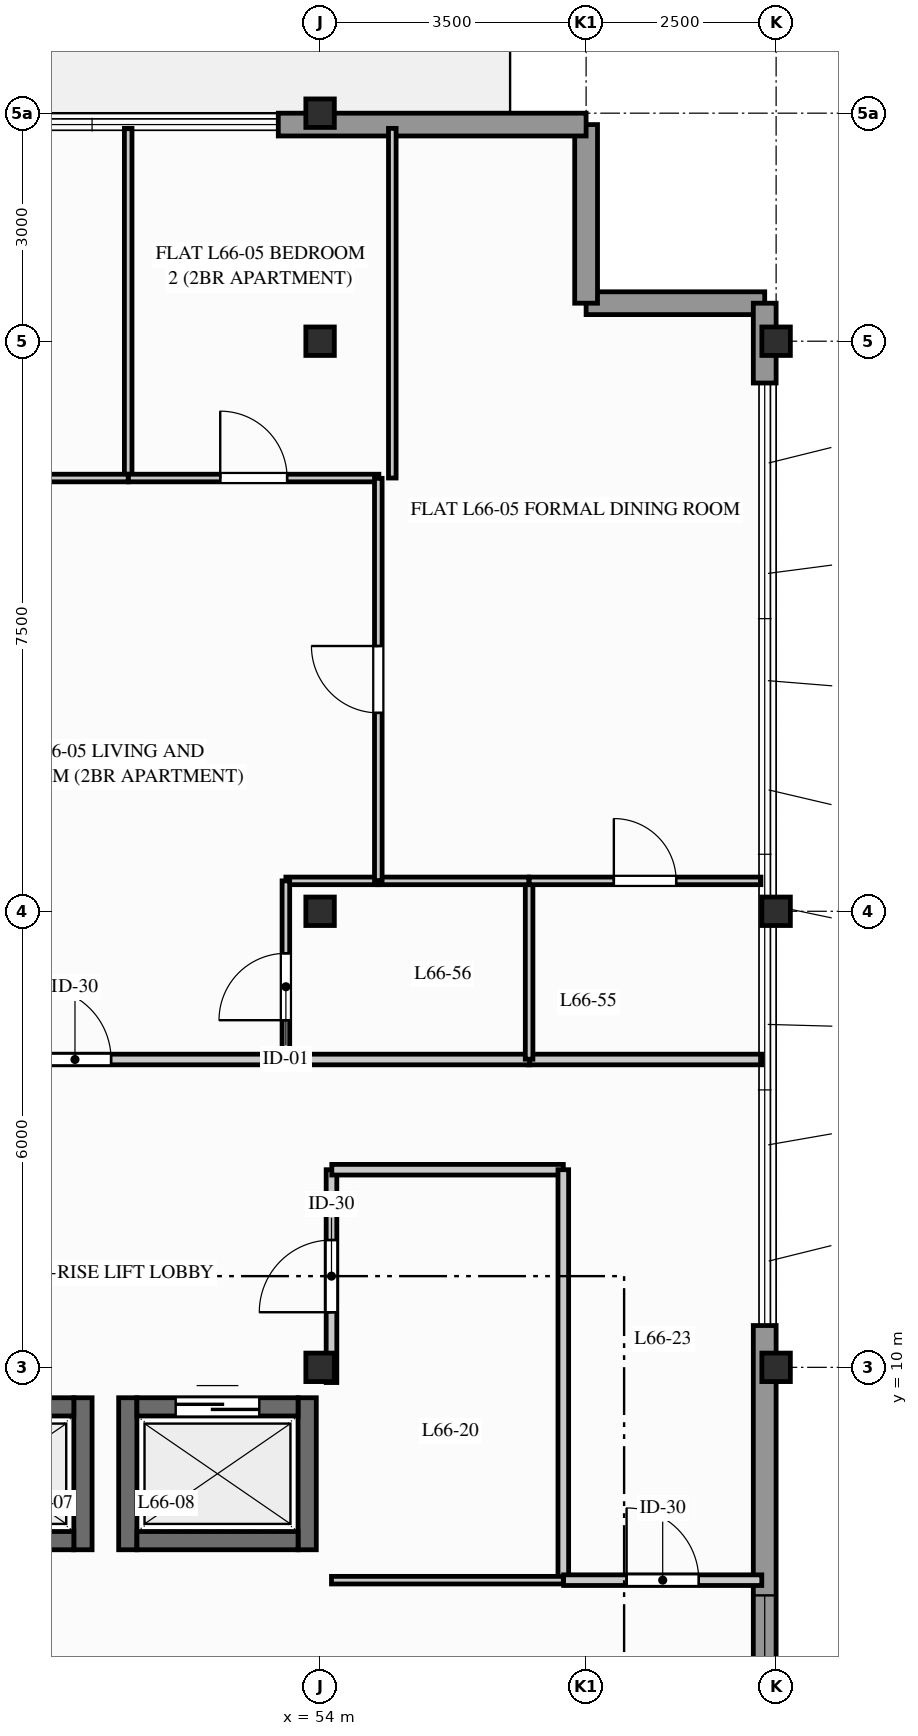
"""IFC4 building model, lengths in metres.
Left out: names, types, materials, properties, quantities, classifications, styles, units other than length and angle.
Written with IfcOpenShell. Run it as: python <this file> out.ifc"""

import sys

from ifc_helpers import new_model, si_unit, direction, frame, frame_2d, origin, origin_2d, place, context, subcontext, project, spatial, rectangle, i_section, extrude, element, fill, save


model = new_model("IFC4")
c1 = context("Model", 3, precision=1e-05, world=origin(), true_north=direction((0.0, 1.0)))
c2 = subcontext(c1, "Body", "Model", "MODEL_VIEW")
j1 = project(units=[si_unit("LENGTHUNIT", "METRE"), si_unit("PLANEANGLEUNIT", "RADIAN")], contexts=[c1])
p1 = place(None, origin())
s1 = spatial("IfcSite", under=j1, at=p1, CompositionType="ELEMENT")
p2 = place(p1, origin())
s2 = spatial("IfcBuilding", under=s1, at=p2, CompositionType="ELEMENT")
p3 = place(p2, frame((0.0, 0.0, 218.0)))
s3 = spatial("IfcBuildingStorey", under=s2, at=p3, CompositionType="ELEMENT", Elevation=218.0)
for number, where, z_axis, x_axis in (
    (1, (54.0, 10.0, 0.0), (0.0, 0.0, 1.0), (1.0, 0.0, 0.0)),
    (2, (54.0, 16.0, 0.0), (0.0, 0.0, 1.0), (1.0, 0.0, 0.0)),
    (3, (54.0, 23.5, 0.0), (0.0, 0.0, 1.0), (1.0, 0.0, 0.0)),
    (4, (54.0, 26.5, 0.0), (0.0, 0.0, 1.0), (1.0, 0.0, 0.0)),
    (5, (60.0, 10.0, 0.0), (0.0, 0.0, 1.0), (1.0, 0.0, 0.0)),
    (6, (60.0, 16.0, 0.0), (0.0, 0.0, 1.0), (1.0, 0.0, 0.0)),
    (7, (60.0, 23.5, 0.0), (0.0, 0.0, 1.0), (1.0, 0.0, 0.0)),
):
    element("IfcColumn", number, at=place(p3, frame(where, z_axis=z_axis, x_axis=x_axis)), inside=s3, PredefinedType="COLUMN", context=c2, shape_type="SweptSolid", body=[
        extrude(i_section(OverallWidth=0.375, OverallDepth=0.375, WebThickness=0.017, FlangeThickness=0.027, FilletRadius=0.015, at=origin_2d()), origin(), (0.0, 0.0, 1.0), 3.1),
    ])
for number, where, z_axis, x_axis in (
    (8, (59.85, 24.0, 0.0), (0.0, 0.0, 1.0), (-1.0, 0.0, 0.0)),
    (9, (57.5, 24.0, 0.0), (0.0, 0.0, 1.0), (0.0, 1.0, 0.0)),
):
    element("IfcWall", number, at=place(p3, frame(where, z_axis=z_axis, x_axis=x_axis)), inside=s3, PredefinedType="STANDARD", context=c2, shape_type="SweptSolid", body=[
        extrude(rectangle(XDim=2.35, YDim=0.3, at=frame_2d((1.175, 0.0))), origin(), (0.0, 0.0, 1.0), 2.89),
    ])
p4 = place(p3, frame((59.85, 2.5, 0.0), z_axis=(0.0, 0.0, 1.0), x_axis=(0.0, 1.0, 0.0)))
e10 = element("IfcWall", 10, at=p4, inside=s3, PredefinedType="STANDARD", context=c2, shape_type="SweptSolid", body=[
    extrude(rectangle(XDim=8.05, YDim=0.3, at=frame_2d((4.025, 0.0))), origin(), (0.0, 0.0, 1.0), 2.89),
])
p5 = place(p4, frame((3.0, 0.0, 0.87)))
e11 = element("IfcOpeningElement", 11, at=p5, cuts=e10, PredefinedType="OPENING", context=c2, shape_type="SweptSolid", body=[
    extrude(rectangle(XDim=1.5, YDim=1.8, at=frame_2d((0.75, 0.9))), frame((0.0, 0.16, 0.0), z_axis=(0.0, -1.0, 0.0), x_axis=(1.0, 0.0, 0.0)), (0.0, 0.0, 1.0), 0.32),
])
p6 = place(p3, frame((59.85, 22.95, 0.0), z_axis=(0.0, 0.0, 1.0), x_axis=(0.0, 1.0, 0.0)))
e12 = element("IfcWall", 12, at=p6, inside=s3, PredefinedType="STANDARD", context=c2, shape_type="SweptSolid", body=[
    extrude(rectangle(XDim=1.05, YDim=0.3, at=frame_2d((0.525, 0.0))), origin(), (0.0, 0.0, 1.0), 2.89),
])
p7 = place(p3, frame((53.45, 26.35, 0.0), z_axis=(0.0, 0.0, 1.0), x_axis=(1.0, 0.0, 0.0)))
e13 = element("IfcWall", 13, at=p7, inside=s3, PredefinedType="STANDARD", context=c2, shape_type="SweptSolid", body=[
    extrude(rectangle(XDim=4.05, YDim=0.3, at=frame_2d((2.025, 0.0))), origin(), (0.0, 0.0, 1.0), 2.89),
])
p8 = place(p3, frame((50.88, 7.6, 0.0), z_axis=(0.0, 0.0, 1.0), x_axis=(0.0, 1.0, 0.0)))
e14 = element("IfcWall", 14, at=p8, inside=s3, PredefinedType="SHEAR", context=c2, shape_type="SweptSolid", body=[
    extrude(rectangle(XDim=2.0, YDim=0.24, at=frame_2d((1.0, 0.0))), origin(), (0.0, 0.0, 1.0), 2.89),
])
p9 = place(p3, frame((48.64, 7.72, 0.0), z_axis=(0.0, 0.0, 1.0), x_axis=(1.0, 0.0, 0.0)))
e15 = element("IfcWall", 15, at=p9, inside=s3, PredefinedType="SHEAR", context=c2, shape_type="SweptSolid", body=[
    extrude(rectangle(XDim=2.12, YDim=0.24, at=frame_2d((1.06, 0.0))), origin(), (0.0, 0.0, 1.0), 2.89),
])
p10 = place(p3, frame((48.64, 9.48, 0.0), z_axis=(0.0, 0.0, 1.0), x_axis=(1.0, 0.0, 0.0)))
e16 = element("IfcWall", 16, at=p10, inside=s3, PredefinedType="SHEAR", context=c2, shape_type="SweptSolid", body=[
    extrude(rectangle(XDim=2.12, YDim=0.24, at=frame_2d((1.06, 0.0))), origin(), (0.0, 0.0, 1.0), 2.89),
])
p11 = place(p10, frame((0.51, 0.0, 0.0)))
e17 = element("IfcOpeningElement", 17, at=p11, cuts=e16, PredefinedType="OPENING", context=c2, shape_type="SweptSolid", body=[
    extrude(rectangle(XDim=1.1, YDim=2.06, at=frame_2d((0.55, 1.03))), frame((0.0, 0.13, 0.0), z_axis=(0.0, -1.0, 0.0), x_axis=(1.0, 0.0, 0.0)), (0.0, 0.0, 1.0), 0.26),
])
for number, where, z_axis, x_axis in (
    (18, (51.47, 7.6, 0.0), (0.0, 0.0, 1.0), (0.0, 1.0, 0.0)),
    (19, (53.83, 7.6, 0.0), (0.0, 0.0, 1.0), (0.0, 1.0, 0.0)),
):
    element("IfcWall", number, at=place(p3, frame(where, z_axis=z_axis, x_axis=x_axis)), inside=s3, PredefinedType="SHEAR", context=c2, shape_type="SweptSolid", body=[
        extrude(rectangle(XDim=2.0, YDim=0.24, at=frame_2d((1.0, 0.0))), origin(), (0.0, 0.0, 1.0), 2.89),
    ])
p12 = place(p3, frame((51.59, 7.72, 0.0), z_axis=(0.0, 0.0, 1.0), x_axis=(1.0, 0.0, 0.0)))
e20 = element("IfcWall", 20, at=p12, inside=s3, PredefinedType="SHEAR", context=c2, shape_type="SweptSolid", body=[
    extrude(rectangle(XDim=2.12, YDim=0.24, at=frame_2d((1.06, 0.0))), origin(), (0.0, 0.0, 1.0), 2.89),
])
p13 = place(p3, frame((51.59, 9.48, 0.0), z_axis=(0.0, 0.0, 1.0), x_axis=(1.0, 0.0, 0.0)))
e21 = element("IfcWall", 21, at=p13, inside=s3, PredefinedType="SHEAR", context=c2, shape_type="SweptSolid", body=[
    extrude(rectangle(XDim=2.12, YDim=0.24, at=frame_2d((1.06, 0.0))), origin(), (0.0, 0.0, 1.0), 2.89),
])
p14 = place(p13, frame((0.51, 0.0, 0.0)))
e22 = element("IfcOpeningElement", 22, at=p14, cuts=e21, PredefinedType="OPENING", context=c2, shape_type="SweptSolid", body=[
    extrude(rectangle(XDim=1.1, YDim=2.06, at=frame_2d((0.55, 1.03))), frame((0.0, 0.13, 0.0), z_axis=(0.0, -1.0, 0.0), x_axis=(1.0, 0.0, 0.0)), (0.0, 0.0, 1.0), 0.26),
])
p15 = place(p3, frame((54.15, 9.8, 0.0), z_axis=(0.0, 0.0, 1.0), x_axis=(0.0, 1.0, 0.0)))
e23 = element("IfcWall", 23, at=p15, inside=s3, PredefinedType="PARTITIONING", context=c2, shape_type="SweptSolid", body=[
    extrude(rectangle(XDim=2.8, YDim=0.14, at=frame_2d((1.4, 0.0))), origin(), (0.0, 0.0, 1.0), 2.325),
])
p16 = place(p15, frame((0.925, 0.0, 0.0)))
e24 = element("IfcOpeningElement", 24, at=p16, cuts=e23, PredefinedType="OPENING", context=c2, shape_type="SweptSolid", body=[
    extrude(rectangle(XDim=0.95, YDim=2.05, at=frame_2d((0.475, 1.025))), frame((0.0, 0.08, 0.0), z_axis=(0.0, -1.0, 0.0), x_axis=(1.0, 0.0, 0.0)), (0.0, 0.0, 1.0), 0.16),
])
p17 = place(p3, frame((54.154, 12.6, 0.0), z_axis=(0.0, 0.0, 1.0), x_axis=(1.0, 0.0, 0.0)))
e25 = element("IfcWall", 25, at=p17, inside=s3, PredefinedType="PARTITIONING", context=c2, shape_type="SweptSolid", body=[
    extrude(rectangle(XDim=3.046, YDim=0.14, at=frame_2d((1.523, 0.0))), origin(), (0.0, 0.0, 1.0), 2.89),
])
p18 = place(p3, frame((57.2, 7.2, 0.0), z_axis=(0.0, 0.0, 1.0), x_axis=(0.0, 1.0, 0.0)))
e26 = element("IfcWall", 26, at=p18, inside=s3, PredefinedType="PARTITIONING", context=c2, shape_type="SweptSolid", body=[
    extrude(rectangle(XDim=5.4, YDim=0.14, at=frame_2d((2.7, 0.0))), origin(), (0.0, 0.0, 1.0), 2.325),
])
p19 = place(p3, frame((54.15, 7.2, 0.0), z_axis=(0.0, 0.0, 1.0), x_axis=(1.0, 0.0, 0.0)))
e27 = element("IfcWall", 27, at=p19, inside=s3, PredefinedType="PARTITIONING", context=c2, shape_type="SweptSolid", body=[
    extrude(rectangle(XDim=3.05, YDim=0.1, at=frame_2d((1.525, 0.0))), origin(), (0.0, 0.0, 1.0), 2.89),
])
p20 = place(p3, frame((56.739, 14.05, 0.0), z_axis=(0.0, 0.0, 1.0), x_axis=(1.0, 0.0, 0.0)))
e28 = element("IfcWall", 28, at=p20, inside=s3, PredefinedType="PARTITIONING", context=c2, shape_type="SweptSolid", body=[
    extrude(rectangle(XDim=3.073, YDim=0.14, at=frame_2d((1.536, 0.0))), origin(), (0.0, 0.0, 1.0), 2.89),
])
p21 = place(p3, frame((53.539, 14.05, 0.0), z_axis=(0.0, 0.0, 1.0), x_axis=(1.0, 0.0, 0.0)))
e29 = element("IfcWall", 29, at=p21, inside=s3, PredefinedType="PARTITIONING", context=c2, shape_type="SweptSolid", body=[
    extrude(rectangle(XDim=3.219, YDim=0.14, at=frame_2d((1.609, 0.0))), origin(), (0.0, 0.0, 1.0), 2.325),
])
p22 = place(p3, frame((47.993, 14.05, 0.0), z_axis=(0.0, 0.0, 1.0), x_axis=(1.0, 0.0, 0.0)))
e30 = element("IfcWall", 30, at=p22, inside=s3, PredefinedType="PARTITIONING", context=c2, shape_type="SweptSolid", body=[
    extrude(rectangle(XDim=5.565, YDim=0.14, at=frame_2d((2.782, 0.0))), origin(), (0.0, 0.0, 1.0), 2.325),
])
p23 = place(p22, frame((2.307, 0.0, 0.0)))
e31 = element("IfcOpeningElement", 31, at=p23, cuts=e30, PredefinedType="OPENING", context=c2, shape_type="SweptSolid", body=[
    extrude(rectangle(XDim=0.95, YDim=2.05, at=frame_2d((0.475, 1.025))), frame((0.0, 0.08, 0.0), z_axis=(0.0, -1.0, 0.0), x_axis=(1.0, 0.0, 0.0)), (0.0, 0.0, 1.0), 0.16),
])
p24 = place(p3, frame((57.204, 7.2, 0.0), z_axis=(0.0, 0.0, 1.0), x_axis=(1.0, 0.0, 0.0)))
e32 = element("IfcWall", 32, at=p24, inside=s3, PredefinedType="PARTITIONING", context=c2, shape_type="SweptSolid", body=[
    extrude(rectangle(XDim=2.607, YDim=0.14, at=frame_2d((1.304, 0.0))), origin(), (0.0, 0.0, 1.0), 2.89),
])
p25 = place(p24, frame((0.829, 0.0, 0.0)))
e33 = element("IfcOpeningElement", 33, at=p25, cuts=e32, PredefinedType="OPENING", context=c2, shape_type="SweptSolid", body=[
    extrude(rectangle(XDim=0.95, YDim=2.05, at=frame_2d((0.475, 1.025))), frame((0.0, 0.08, 0.0), z_axis=(0.0, -1.0, 0.0), x_axis=(1.0, 0.0, 0.0)), (0.0, 0.0, 1.0), 0.16),
])
p26 = place(p3, frame((56.75, 14.054, 0.0), z_axis=(0.0, 0.0, 1.0), x_axis=(0.0, 1.0, 0.0)))
e34 = element("IfcWall", 34, at=p26, inside=s3, PredefinedType="PARTITIONING", context=c2, shape_type="SweptSolid", body=[
    extrude(rectangle(XDim=2.346, YDim=0.1, at=frame_2d((1.173, 0.0))), origin(), (0.0, 0.0, 1.0), 2.325),
])
p27 = place(p3, frame((56.75, 16.4, 0.0), z_axis=(0.0, 0.0, 1.0), x_axis=(1.0, 0.0, 0.0)))
e35 = element("IfcWall", 35, at=p27, inside=s3, PredefinedType="PARTITIONING", context=c2, shape_type="SweptSolid", body=[
    extrude(rectangle(XDim=3.05, YDim=0.1, at=frame_2d((1.525, 0.0))), origin(), (0.0, 0.0, 1.0), 2.89),
])
p28 = place(p27, frame((1.115, 0.0, 0.0)))
e36 = element("IfcOpeningElement", 36, at=p28, cuts=e35, PredefinedType="OPENING", context=c2, shape_type="SweptSolid", body=[
    extrude(rectangle(XDim=0.82, YDim=2.02, at=frame_2d((0.41, 1.01))), frame((0.0, 0.06, 0.0), z_axis=(0.0, -1.0, 0.0), x_axis=(1.0, 0.0, 0.0)), (0.0, 0.0, 1.0), 0.12),
])
p29 = place(p3, frame((54.755, 16.4, 0.0), z_axis=(0.0, 0.0, 1.0), x_axis=(1.0, 0.0, 0.0)))
e37 = element("IfcWall", 37, at=p29, inside=s3, PredefinedType="PARTITIONING", context=c2, shape_type="SweptSolid", body=[
    extrude(rectangle(XDim=1.991, YDim=0.1, at=frame_2d((0.996, 0.0))), origin(), (0.0, 0.0, 1.0), 2.89),
])
p30 = place(p3, frame((53.55, 16.4, 0.0), z_axis=(0.0, 0.0, 1.0), x_axis=(1.0, 0.0, 0.0)))
e38 = element("IfcWall", 38, at=p30, inside=s3, PredefinedType="PARTITIONING", context=c2, shape_type="SweptSolid", body=[
    extrude(rectangle(XDim=1.223, YDim=0.1, at=frame_2d((0.612, 0.0))), origin(), (0.0, 0.0, 1.0), 2.325),
])
p31 = place(p3, frame((53.55, 14.054, 0.0), z_axis=(0.0, 0.0, 1.0), x_axis=(0.0, 1.0, 0.0)))
e39 = element("IfcWall", 39, at=p31, inside=s3, PredefinedType="PARTITIONING", context=c2, shape_type="SweptSolid", body=[
    extrude(rectangle(XDim=2.346, YDim=0.1, at=frame_2d((1.173, 0.0))), origin(), (0.0, 0.0, 1.0), 2.325),
])
p32 = place(p31, frame((0.513, 0.0, 0.0)))
e40 = element("IfcOpeningElement", 40, at=p32, cuts=e39, PredefinedType="OPENING", context=c2, shape_type="SweptSolid", body=[
    extrude(rectangle(XDim=0.88, YDim=2.04, at=frame_2d((0.44, 1.02))), frame((0.0, 0.06, 0.0), z_axis=(0.0, -1.0, 0.0), x_axis=(1.0, 0.0, 0.0)), (0.0, 0.0, 1.0), 0.12),
])
p33 = place(p3, frame((51.475, 21.7, 0.0), z_axis=(0.0, 0.0, 1.0), x_axis=(0.0, 1.0, 0.0)))
e41 = element("IfcWall", 41, at=p33, inside=s3, PredefinedType="PARTITIONING", context=c2, shape_type="SweptSolid", body=[
    extrude(rectangle(XDim=4.6, YDim=0.1, at=frame_2d((2.3, 0.0))), origin(), (0.0, 0.0, 1.0), 2.325),
])
p34 = place(p3, frame((48.004, 21.7, 0.0), z_axis=(0.0, 0.0, 1.0), x_axis=(1.0, 0.0, 0.0)))
e42 = element("IfcWall", 42, at=p34, inside=s3, PredefinedType="PARTITIONING", context=c2, shape_type="SweptSolid", body=[
    extrude(rectangle(XDim=3.471, YDim=0.1, at=frame_2d((1.736, 0.0))), origin(), (0.0, 0.0, 1.0), 2.325),
])
p35 = place(p34, frame((1.295, 0.0, 0.0)))
e43 = element("IfcOpeningElement", 43, at=p35, cuts=e42, PredefinedType="OPENING", context=c2, shape_type="SweptSolid", body=[
    extrude(rectangle(XDim=0.88, YDim=2.04, at=frame_2d((0.44, 1.02))), frame((0.0, 0.06, 0.0), z_axis=(0.0, -1.0, 0.0), x_axis=(1.0, 0.0, 0.0)), (0.0, 0.0, 1.0), 0.12),
])
p36 = place(p3, frame((54.95, 21.7, 0.0), z_axis=(0.0, 0.0, 1.0), x_axis=(0.0, 1.0, 0.0)))
e44 = element("IfcWall", 44, at=p36, inside=s3, PredefinedType="PARTITIONING", context=c2, shape_type="SweptSolid", body=[
    extrude(rectangle(XDim=4.6, YDim=0.1, at=frame_2d((2.3, 0.0))), origin(), (0.0, 0.0, 1.0), 2.325),
])
p37 = place(p3, frame((51.479, 21.7, 0.0), z_axis=(0.0, 0.0, 1.0), x_axis=(1.0, 0.0, 0.0)))
e45 = element("IfcWall", 45, at=p37, inside=s3, PredefinedType="PARTITIONING", context=c2, shape_type="SweptSolid", body=[
    extrude(rectangle(XDim=3.294, YDim=0.1, at=frame_2d((1.647, 0.0))), origin(), (0.0, 0.0, 1.0), 2.325),
])
p38 = place(p37, frame((1.207, 0.0, 0.0)))
e46 = element("IfcOpeningElement", 46, at=p38, cuts=e45, PredefinedType="OPENING", context=c2, shape_type="SweptSolid", body=[
    extrude(rectangle(XDim=0.88, YDim=2.04, at=frame_2d((0.44, 1.02))), frame((0.0, 0.06, 0.0), z_axis=(0.0, -1.0, 0.0), x_axis=(1.0, 0.0, 0.0)), (0.0, 0.0, 1.0), 0.12),
])
p39 = place(p3, frame((54.766, 16.404, 0.0), z_axis=(0.0, 0.0, 1.0), x_axis=(0.0, 1.0, 0.0)))
e47 = element("IfcWall", 47, at=p39, inside=s3, PredefinedType="PARTITIONING", context=c2, shape_type="SweptSolid", body=[
    extrude(rectangle(XDim=5.292, YDim=0.1, at=frame_2d((2.646, 0.0))), origin(), (0.0, 0.0, 1.0), 2.614),
])
p40 = place(p39, frame((2.206, 0.0, 0.0)))
e48 = element("IfcOpeningElement", 48, at=p40, cuts=e47, PredefinedType="OPENING", context=c2, shape_type="SweptSolid", body=[
    extrude(rectangle(XDim=0.88, YDim=2.04, at=frame_2d((0.44, 1.02))), frame((0.0, 0.06, 0.0), z_axis=(0.0, -1.0, 0.0), x_axis=(1.0, 0.0, 0.0)), (0.0, 0.0, 1.0), 0.12),
])
p41 = place(p5, origin())
e49 = element("IfcWindow", 49, at=p41, inside=s3, PartitioningType="SINGLE_PANEL", PredefinedType="WINDOW", context=c2, shape_type="SweptSolid", body=[
    extrude(rectangle(XDim=1.5, YDim=1.8, at=frame_2d((0.75, 0.9))), frame((0.0, 0.03, 0.0), z_axis=(0.0, -1.0, 0.0), x_axis=(1.0, 0.0, 0.0)), (0.0, 0.0, 1.0), 0.06),
])
fill(e11, e49)
p42 = place(p14, origin())
e50 = element("IfcDoor", 50, at=p42, inside=s3, OperationType="SLIDING_TO_RIGHT", PredefinedType="DOOR", context=c2, shape_type="SweptSolid", body=[
    extrude(rectangle(XDim=1.1, YDim=2.06, at=frame_2d((0.55, 1.03))), frame((0.0, 0.025, 0.0), z_axis=(0.0, -1.0, 0.0), x_axis=(1.0, 0.0, 0.0)), (0.0, 0.0, 1.0), 0.05),
])
fill(e22, e50)
p43 = place(p16, origin())
e51 = element("IfcDoor", 51, at=p43, inside=s3, OperationType="SINGLE_SWING_LEFT", PredefinedType="DOOR", context=c2, shape_type="SweptSolid", body=[
    extrude(rectangle(XDim=0.95, YDim=2.05, at=frame_2d((0.475, 1.025))), frame((0.0, 0.025, 0.0), z_axis=(0.0, -1.0, 0.0), x_axis=(1.0, 0.0, 0.0)), (0.0, 0.0, 1.0), 0.05),
])
fill(e24, e51)
p44 = place(p23, origin())
e52 = element("IfcDoor", 52, at=p44, inside=s3, OperationType="SINGLE_SWING_LEFT", PredefinedType="DOOR", context=c2, shape_type="SweptSolid", body=[
    extrude(rectangle(XDim=0.95, YDim=2.05, at=frame_2d((0.475, 1.025))), frame((0.0, 0.025, 0.0), z_axis=(0.0, -1.0, 0.0), x_axis=(1.0, 0.0, 0.0)), (0.0, 0.0, 1.0), 0.05),
])
fill(e31, e52)
p45 = place(p25, origin())
e53 = element("IfcDoor", 53, at=p45, inside=s3, OperationType="SINGLE_SWING_LEFT", PredefinedType="DOOR", context=c2, shape_type="SweptSolid", body=[
    extrude(rectangle(XDim=0.95, YDim=2.05, at=frame_2d((0.475, 1.025))), frame((0.0, 0.025, 0.0), z_axis=(0.0, -1.0, 0.0), x_axis=(1.0, 0.0, 0.0)), (0.0, 0.0, 1.0), 0.05),
])
fill(e33, e53)
p46 = place(p32, origin())
e54 = element("IfcDoor", 54, at=p46, inside=s3, OperationType="SINGLE_SWING_LEFT", PredefinedType="DOOR", context=c2, shape_type="SweptSolid", body=[
    extrude(rectangle(XDim=0.88, YDim=2.04, at=frame_2d((0.44, 1.02))), frame((0.0, 0.025, 0.0), z_axis=(0.0, -1.0, 0.0), x_axis=(1.0, 0.0, 0.0)), (0.0, 0.0, 1.0), 0.05),
])
fill(e40, e54)
p47 = place(p38, origin())
e55 = element("IfcDoor", 55, at=p47, inside=s3, OperationType="SINGLE_SWING_LEFT", PredefinedType="DOOR", context=c2, shape_type="SweptSolid", body=[
    extrude(rectangle(XDim=0.88, YDim=2.04, at=frame_2d((0.44, 1.02))), frame((0.0, 0.025, 0.0), z_axis=(0.0, -1.0, 0.0), x_axis=(1.0, 0.0, 0.0)), (0.0, 0.0, 1.0), 0.05),
])
fill(e46, e55)
p48 = place(p40, origin())
e56 = element("IfcDoor", 56, at=p48, inside=s3, OperationType="SINGLE_SWING_RIGHT", PredefinedType="DOOR", context=c2, shape_type="SweptSolid", body=[
    extrude(rectangle(XDim=0.88, YDim=2.04, at=frame_2d((0.44, 1.02))), frame((0.0, 0.025, 0.0), z_axis=(0.0, -1.0, 0.0), x_axis=(1.0, 0.0, 0.0)), (0.0, 0.0, 1.0), 0.05),
])
fill(e48, e56)
p49 = place(p28, origin())
e57 = element("IfcDoor", 57, at=p49, inside=s3, OperationType="SINGLE_SWING_LEFT", PredefinedType="DOOR", context=c2, shape_type="SweptSolid", body=[
    extrude(rectangle(XDim=0.82, YDim=2.02, at=frame_2d((0.41, 1.01))), frame((0.0, 0.025, 0.0), z_axis=(0.0, -1.0, 0.0), x_axis=(1.0, 0.0, 0.0)), (0.0, 0.0, 1.0), 0.05),
])
fill(e36, e57)
save(model, sys.argv[1])
